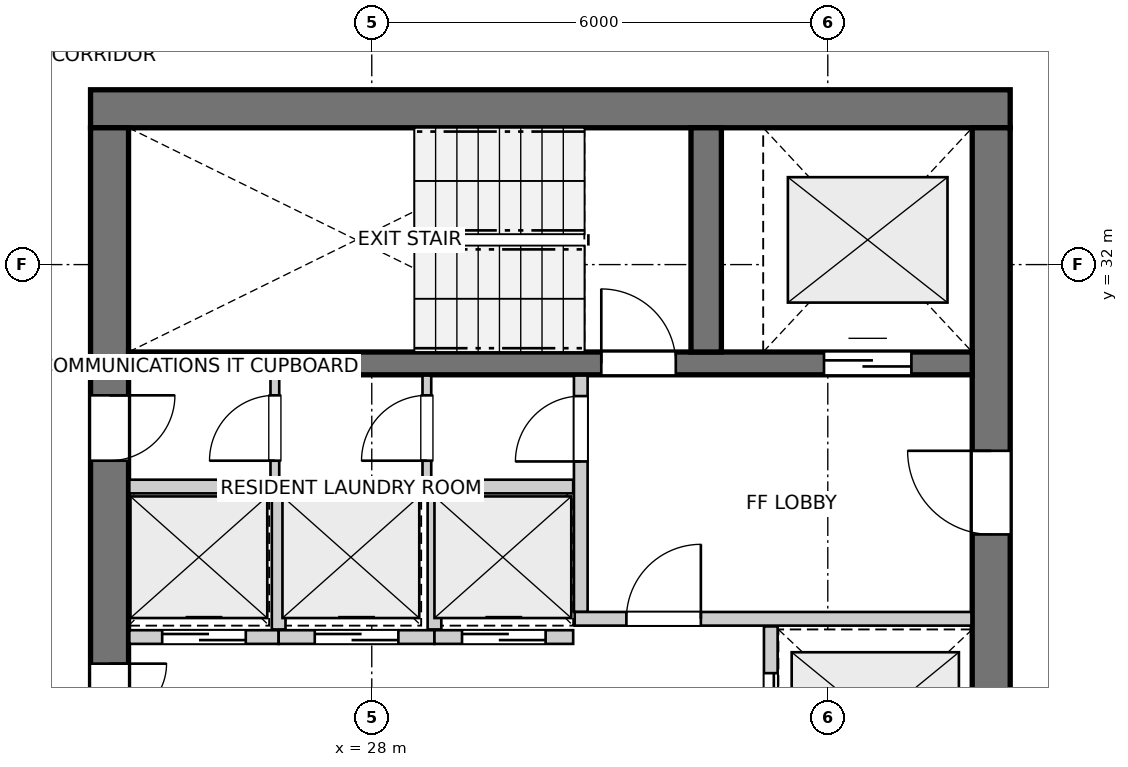
"""IFC4 building model, lengths in metres.
Left out: names, types, materials, properties, quantities, classifications, styles, units other than length and angle.
Written with IfcOpenShell. Run it as: python <this file> out.ifc"""

import sys

from ifc_helpers import new_model, si_unit, direction, frame, frame_2d, origin, place, context, subcontext, project, spatial, rectangle, extrude, source, transform, mapped, element, fill, save


model = new_model("IFC4")
c1 = context("Model", 3, precision=1e-05, world=origin(), true_north=direction((0.0, 1.0)))
c2 = subcontext(c1, "Body", "Model", "MODEL_VIEW")
j1 = project(units=[si_unit("LENGTHUNIT", "METRE"), si_unit("PLANEANGLEUNIT", "RADIAN")], contexts=[c1])
p1 = place(None, origin())
s1 = spatial("IfcSite", under=j1, at=p1, CompositionType="ELEMENT")
p2 = place(p1, origin())
s2 = spatial("IfcBuilding", under=s1, at=p2, CompositionType="ELEMENT")
p3 = place(p2, frame((0.0, 0.0, 221.2)))
s3 = spatial("IfcBuildingStorey", under=s2, at=p3, CompositionType="ELEMENT", Elevation=221.2)
p4 = place(p3, frame((36.4, 34.05, 0.0), z_axis=(0.0, 0.0, 1.0), x_axis=(-1.0, 0.0, 0.0)))
e1 = element("IfcWall", 1, at=p4, inside=s3, PredefinedType="SHEAR", context=c2, shape_type="SweptSolid", body=[
    extrude(rectangle(XDim=12.1, YDim=0.5, at=frame_2d((6.05, 0.0))), origin(), (0.0, 0.0, 1.0), 2.96),
])
p5 = place(p3, frame((24.55, 33.8, 0.0), z_axis=(0.0, 0.0, 1.0), x_axis=(0.0, -1.0, 0.0)))
e2 = element("IfcWall", 2, at=p5, inside=s3, PredefinedType="SHEAR", context=c2, shape_type="SweptSolid", body=[
    extrude(rectangle(XDim=15.6, YDim=0.5, at=frame_2d((7.8, 0.0))), origin(), (0.0, 0.0, 1.0), 2.96),
])
p6 = place(p5, frame((7.05, 0.0, 0.0)))
e3 = element("IfcOpeningElement", 3, at=p6, cuts=e2, PredefinedType="OPENING", context=c2, shape_type="SweptSolid", body=[
    extrude(rectangle(XDim=1.5, YDim=2.15, at=frame_2d((0.75, 1.075))), frame((0.0, 0.26, 0.0), z_axis=(0.0, -1.0, 0.0), x_axis=(1.0, 0.0, 0.0)), (0.0, 0.0, 1.0), 0.52),
])
p7 = place(p5, frame((3.52, 0.0, 0.0)))
e4 = element("IfcOpeningElement", 4, at=p7, cuts=e2, PredefinedType="OPENING", context=c2, shape_type="SweptSolid", body=[
    extrude(rectangle(XDim=0.86, YDim=2.05, at=frame_2d((0.43, 1.025))), frame((0.0, 0.26, 0.0), z_axis=(0.0, -1.0, 0.0), x_axis=(1.0, 0.0, 0.0)), (0.0, 0.0, 1.0), 0.52),
])
p8 = place(p5, frame((11.22, 0.0, 0.0)))
e5 = element("IfcOpeningElement", 5, at=p8, cuts=e2, PredefinedType="OPENING", context=c2, shape_type="SweptSolid", body=[
    extrude(rectangle(XDim=0.86, YDim=2.05, at=frame_2d((0.43, 1.025))), frame((0.0, 0.26, 0.0), z_axis=(0.0, -1.0, 0.0), x_axis=(1.0, 0.0, 0.0)), (0.0, 0.0, 1.0), 0.52),
])
p9 = place(p3, frame((36.15, 18.2, 0.0), z_axis=(0.0, 0.0, 1.0), x_axis=(0.0, 1.0, 0.0)))
e6 = element("IfcWall", 6, at=p9, inside=s3, PredefinedType="SHEAR", context=c2, shape_type="SweptSolid", body=[
    extrude(rectangle(XDim=15.6, YDim=0.5, at=frame_2d((7.8, 0.0))), origin(), (0.0, 0.0, 1.0), 2.96),
])
p10 = place(p9, frame((4.25, 0.0, 0.0)))
e7 = element("IfcOpeningElement", 7, at=p10, cuts=e6, PredefinedType="OPENING", context=c2, shape_type="SweptSolid", body=[
    extrude(rectangle(XDim=1.1, YDim=2.15, at=frame_2d((0.55, 1.075))), frame((0.0, 0.26, 0.0), z_axis=(0.0, -1.0, 0.0), x_axis=(1.0, 0.0, 0.0)), (0.0, 0.0, 1.0), 0.52),
])
p11 = place(p9, frame((10.25, 0.0, 0.0)))
e8 = element("IfcOpeningElement", 8, at=p11, cuts=e6, PredefinedType="OPENING", context=c2, shape_type="SweptSolid", body=[
    extrude(rectangle(XDim=1.1, YDim=2.15, at=frame_2d((0.55, 1.075))), frame((0.0, 0.26, 0.0), z_axis=(0.0, -1.0, 0.0), x_axis=(1.0, 0.0, 0.0)), (0.0, 0.0, 1.0), 0.52),
])
p12 = place(p3, frame((24.8, 30.7, 0.0), z_axis=(0.0, 0.0, 1.0), x_axis=(1.0, 0.0, 0.0)))
e9 = element("IfcWall", 9, at=p12, inside=s3, PredefinedType="SHEAR", context=c2, shape_type="SweptSolid", body=[
    extrude(rectangle(XDim=11.1, YDim=0.3, at=frame_2d((5.55, 0.0))), origin(), (0.0, 0.0, 1.0), 2.96),
])
p13 = place(p12, frame((6.22, 0.0, 0.0)))
e10 = element("IfcOpeningElement", 10, at=p13, cuts=e9, PredefinedType="OPENING", context=c2, shape_type="SweptSolid", body=[
    extrude(rectangle(XDim=0.98, YDim=2.15, at=frame_2d((0.49, 1.075))), frame((0.0, 0.16, 0.0), z_axis=(0.0, -1.0, 0.0), x_axis=(1.0, 0.0, 0.0)), (0.0, 0.0, 1.0), 0.32),
])
p14 = place(p12, frame((9.15, 0.0, 0.0)))
e11 = element("IfcOpeningElement", 11, at=p14, cuts=e9, PredefinedType="OPENING", context=c2, shape_type="SweptSolid", body=[
    extrude(rectangle(XDim=1.15, YDim=2.15, at=frame_2d((0.575, 1.075))), frame((0.0, 0.16, 0.0), z_axis=(0.0, -1.0, 0.0), x_axis=(1.0, 0.0, 0.0)), (0.0, 0.0, 1.0), 0.32),
])
p15 = place(p3, frame((32.4, 30.85, 0.0), z_axis=(0.0, 0.0, 1.0), x_axis=(0.0, 1.0, 0.0)))
e12 = element("IfcWall", 12, at=p15, inside=s3, PredefinedType="SHEAR", context=c2, shape_type="SweptSolid", body=[
    extrude(rectangle(XDim=2.95, YDim=0.4, at=frame_2d((1.475, 0.0))), origin(), (0.0, 0.0, 1.0), 2.96),
])
p16 = place(p3, frame((30.75, 27.43, 0.0), z_axis=(0.0, 0.0, 1.0), x_axis=(0.0, 1.0, 0.0)))
e13 = element("IfcWall", 13, at=p16, inside=s3, PredefinedType="PARTITIONING", context=c2, shape_type="SweptSolid", body=[
    extrude(rectangle(XDim=3.11, YDim=0.18, at=frame_2d((1.555, 0.0))), origin(), (0.0, 0.0, 1.0), 2.96),
])
p17 = place(p16, frame((1.98, 0.0, 0.0)))
e14 = element("IfcOpeningElement", 14, at=p17, cuts=e13, PredefinedType="OPENING", context=c2, shape_type="SweptSolid", body=[
    extrude(rectangle(XDim=0.86, YDim=2.05, at=frame_2d((0.43, 1.025))), frame((0.0, 0.1, 0.0), z_axis=(0.0, -1.0, 0.0), x_axis=(1.0, 0.0, 0.0)), (0.0, 0.0, 1.0), 0.2),
])
p18 = place(p3, frame((30.67, 27.34, 0.0), z_axis=(0.0, 0.0, 1.0), x_axis=(1.0, 0.0, 0.0)))
e15 = element("IfcWall", 15, at=p18, inside=s3, PredefinedType="PARTITIONING", context=c2, shape_type="SweptSolid", body=[
    extrude(rectangle(XDim=5.22, YDim=0.18, at=frame_2d((2.61, 0.0))), origin(), (0.0, 0.0, 1.0), 2.96),
])
p19 = place(p18, frame((0.68, 0.0, 0.0)))
e16 = element("IfcOpeningElement", 16, at=p19, cuts=e15, PredefinedType="OPENING", context=c2, shape_type="SweptSolid", body=[
    extrude(rectangle(XDim=0.98, YDim=2.15, at=frame_2d((0.49, 1.075))), frame((0.0, 0.1, 0.0), z_axis=(0.0, -1.0, 0.0), x_axis=(1.0, 0.0, 0.0)), (0.0, 0.0, 1.0), 0.2),
])
p20 = place(p3, frame((33.25, 24.76, 0.0), z_axis=(0.0, 0.0, 1.0), x_axis=(0.0, 1.0, 0.0)))
e17 = element("IfcWall", 17, at=p20, inside=s3, PredefinedType="PARTITIONING", context=c2, shape_type="SweptSolid", body=[
    extrude(rectangle(XDim=2.48, YDim=0.18, at=frame_2d((1.24, 0.0))), origin(), (0.0, 0.0, 1.0), 2.96),
])
p21 = place(p20, frame((0.615, 0.0, 0.0)))
e18 = element("IfcOpeningElement", 18, at=p21, cuts=e17, PredefinedType="OPENING", context=c2, shape_type="SweptSolid", body=[
    extrude(rectangle(XDim=1.25, YDim=2.15, at=frame_2d((0.625, 1.075))), frame((0.0, 0.1, 0.0), z_axis=(0.0, -1.0, 0.0), x_axis=(1.0, 0.0, 0.0)), (0.0, 0.0, 1.0), 0.2),
])
p22 = place(p3, frame((24.81, 29.08, 0.0), z_axis=(0.0, 0.0, 1.0), x_axis=(1.0, 0.0, 0.0)))
e19 = element("IfcWall", 19, at=p22, inside=s3, PredefinedType="PARTITIONING", context=c2, shape_type="SweptSolid", body=[
    extrude(rectangle(XDim=5.84, YDim=0.18, at=frame_2d((2.92, 0.0))), origin(), (0.0, 0.0, 1.0), 2.96),
])
p23 = place(p3, frame((24.81, 27.1, 0.0), z_axis=(0.0, 0.0, 1.0), x_axis=(1.0, 0.0, 0.0)))
e20 = element("IfcWall", 20, at=p23, inside=s3, PredefinedType="PARTITIONING", context=c2, shape_type="SweptSolid", body=[
    extrude(rectangle(XDim=1.965, YDim=0.18, at=frame_2d((0.982, 0.0))), origin(), (0.0, 0.0, 1.0), 2.96),
])
p24 = place(p23, frame((0.433, 0.0, 0.0)))
e21 = element("IfcOpeningElement", 21, at=p24, cuts=e20, PredefinedType="OPENING", context=c2, shape_type="SweptSolid", body=[
    extrude(rectangle(XDim=1.1, YDim=2.15, at=frame_2d((0.55, 1.075))), frame((0.0, 0.1, 0.0), z_axis=(0.0, -1.0, 0.0), x_axis=(1.0, 0.0, 0.0)), (0.0, 0.0, 1.0), 0.2),
])
p25 = place(p3, frame((26.775, 27.1, 0.0), z_axis=(0.0, 0.0, 1.0), x_axis=(1.0, 0.0, 0.0)))
e22 = element("IfcWall", 22, at=p25, inside=s3, PredefinedType="PARTITIONING", context=c2, shape_type="SweptSolid", body=[
    extrude(rectangle(XDim=2.05, YDim=0.18, at=frame_2d((1.025, 0.0))), origin(), (0.0, 0.0, 1.0), 2.96),
])
p26 = place(p25, frame((0.475, 0.0, 0.0)))
e23 = element("IfcOpeningElement", 23, at=p26, cuts=e22, PredefinedType="OPENING", context=c2, shape_type="SweptSolid", body=[
    extrude(rectangle(XDim=1.1, YDim=2.15, at=frame_2d((0.55, 1.075))), frame((0.0, 0.1, 0.0), z_axis=(0.0, -1.0, 0.0), x_axis=(1.0, 0.0, 0.0)), (0.0, 0.0, 1.0), 0.2),
])
p27 = place(p3, frame((26.775, 27.2, 0.0), z_axis=(0.0, 0.0, 1.0), x_axis=(0.0, 1.0, 0.0)))
e24 = element("IfcWall", 24, at=p27, inside=s3, PredefinedType="PARTITIONING", context=c2, shape_type="SweptSolid", body=[
    extrude(rectangle(XDim=1.78, YDim=0.18, at=frame_2d((0.89, 0.0))), origin(), (0.0, 0.0, 1.0), 2.96),
])
p28 = place(p3, frame((28.825, 27.1, 0.0), z_axis=(0.0, 0.0, 1.0), x_axis=(1.0, 0.0, 0.0)))
e25 = element("IfcWall", 25, at=p28, inside=s3, PredefinedType="PARTITIONING", context=c2, shape_type="SweptSolid", body=[
    extrude(rectangle(XDim=1.825, YDim=0.18, at=frame_2d((0.913, 0.0))), origin(), (0.0, 0.0, 1.0), 2.96),
])
p29 = place(p28, frame((0.363, 0.0, 0.0)))
e26 = element("IfcOpeningElement", 26, at=p29, cuts=e25, PredefinedType="OPENING", context=c2, shape_type="SweptSolid", body=[
    extrude(rectangle(XDim=1.1, YDim=2.15, at=frame_2d((0.55, 1.075))), frame((0.0, 0.1, 0.0), z_axis=(0.0, -1.0, 0.0), x_axis=(1.0, 0.0, 0.0)), (0.0, 0.0, 1.0), 0.2),
])
p30 = place(p3, frame((28.825, 27.2, 0.0), z_axis=(0.0, 0.0, 1.0), x_axis=(0.0, 1.0, 0.0)))
e27 = element("IfcWall", 27, at=p30, inside=s3, PredefinedType="PARTITIONING", context=c2, shape_type="SweptSolid", body=[
    extrude(rectangle(XDim=1.78, YDim=0.18, at=frame_2d((0.89, 0.0))), origin(), (0.0, 0.0, 1.0), 2.96),
])
p31 = place(p3, frame((26.725, 29.16, 0.0), z_axis=(0.0, 0.0, 1.0), x_axis=(0.0, 1.0, 0.0)))
e28 = element("IfcWall", 28, at=p31, inside=s3, PredefinedType="PARTITIONING", context=c2, shape_type="SweptSolid", body=[
    extrude(rectangle(XDim=1.38, YDim=0.115, at=frame_2d((0.69, 0.0))), origin(), (0.0, 0.0, 1.0), 2.96),
])
p32 = place(p31, frame((0.26, 0.0, 0.0)))
e29 = element("IfcOpeningElement", 29, at=p32, cuts=e28, PredefinedType="OPENING", context=c2, shape_type="SweptSolid", body=[
    extrude(rectangle(XDim=0.86, YDim=2.05, at=frame_2d((0.43, 1.025))), frame((0.0, 0.067, 0.0), z_axis=(0.0, -1.0, 0.0), x_axis=(1.0, 0.0, 0.0)), (0.0, 0.0, 1.0), 0.135),
])
p33 = place(p3, frame((28.725, 29.16, 0.0), z_axis=(0.0, 0.0, 1.0), x_axis=(0.0, 1.0, 0.0)))
e30 = element("IfcWall", 30, at=p33, inside=s3, PredefinedType="PARTITIONING", context=c2, shape_type="SweptSolid", body=[
    extrude(rectangle(XDim=1.38, YDim=0.115, at=frame_2d((0.69, 0.0))), origin(), (0.0, 0.0, 1.0), 2.96),
])
p34 = place(p33, frame((0.26, 0.0, 0.0)))
e31 = element("IfcOpeningElement", 31, at=p34, cuts=e30, PredefinedType="OPENING", context=c2, shape_type="SweptSolid", body=[
    extrude(rectangle(XDim=0.86, YDim=2.05, at=frame_2d((0.43, 1.025))), frame((0.0, 0.067, 0.0), z_axis=(0.0, -1.0, 0.0), x_axis=(1.0, 0.0, 0.0)), (0.0, 0.0, 1.0), 0.135),
])
m1 = source(origin(), c2, "Body", "SweptSolid", [
    extrude(rectangle(XDim=0.98, YDim=2.15, at=frame_2d((0.49, 1.075))), frame((0.0, 0.025, 0.0), z_axis=(0.0, -1.0, 0.0), x_axis=(1.0, 0.0, 0.0)), (0.0, 0.0, 1.0), 0.05),
])
p35 = place(p13, origin())
e32 = element("IfcDoor", 32, at=p35, inside=s3, OperationType="SINGLE_SWING_LEFT", PredefinedType="DOOR", context=c2, shape_type="MappedRepresentation", body=[
    mapped(m1, transform((0.0, 0.0, 0.0), x_axis=(1.0, 0.0, 0.0), y_axis=(0.0, 1.0, 0.0), z_axis=(0.0, 0.0, 1.0), scale=1.0)),
])
fill(e10, e32)
m2 = source(origin(), c2, "Body", "SweptSolid", [
    extrude(rectangle(XDim=1.15, YDim=2.15, at=frame_2d((0.575, 1.075))), frame((0.0, 0.025, 0.0), z_axis=(0.0, -1.0, 0.0), x_axis=(1.0, 0.0, 0.0)), (0.0, 0.0, 1.0), 0.05),
])
p36 = place(p14, origin())
e33 = element("IfcDoor", 33, at=p36, inside=s3, OperationType="DOUBLE_DOOR_SLIDING", PredefinedType="DOOR", context=c2, shape_type="MappedRepresentation", body=[
    mapped(m2, transform((0.0, 0.0, 0.0), x_axis=(1.0, 0.0, 0.0), y_axis=(0.0, 1.0, 0.0), z_axis=(0.0, 0.0, 1.0), scale=1.0)),
])
fill(e11, e33)
m3 = source(origin(), c2, "Body", "SweptSolid", [
    extrude(rectangle(XDim=1.1, YDim=2.15, at=frame_2d((0.55, 1.075))), frame((0.0, 0.025, 0.0), z_axis=(0.0, -1.0, 0.0), x_axis=(1.0, 0.0, 0.0)), (0.0, 0.0, 1.0), 0.05),
])
p37 = place(p11, origin())
e34 = element("IfcDoor", 34, at=p37, inside=s3, OperationType="SINGLE_SWING_RIGHT", PredefinedType="DOOR", context=c2, shape_type="MappedRepresentation", body=[
    mapped(m3, transform((0.0, 0.0, 0.0), x_axis=(1.0, 0.0, 0.0), y_axis=(0.0, 1.0, 0.0), z_axis=(0.0, 0.0, 1.0), scale=1.0)),
])
fill(e8, e34)
m4 = source(origin(), c2, "Body", "SweptSolid", [
    extrude(rectangle(XDim=1.5, YDim=2.15, at=frame_2d((0.75, 1.075))), frame((0.0, 0.025, 0.0), z_axis=(0.0, -1.0, 0.0), x_axis=(1.0, 0.0, 0.0)), (0.0, 0.0, 1.0), 0.05),
])
p38 = place(p6, origin())
e35 = element("IfcDoor", 35, at=p38, inside=s3, OperationType="DOUBLE_DOOR_SINGLE_SWING", PredefinedType="DOOR", context=c2, shape_type="MappedRepresentation", body=[
    mapped(m4, transform((0.0, 0.0, 0.0), x_axis=(1.0, 0.0, 0.0), y_axis=(0.0, 1.0, 0.0), z_axis=(0.0, 0.0, 1.0), scale=1.0)),
])
fill(e3, e35)
m5 = source(origin(), c2, "Body", "SweptSolid", [
    extrude(rectangle(XDim=0.86, YDim=2.05, at=frame_2d((0.43, 1.025))), frame((0.0, 0.025, 0.0), z_axis=(0.0, -1.0, 0.0), x_axis=(1.0, 0.0, 0.0)), (0.0, 0.0, 1.0), 0.05),
])
p39 = place(p7, origin())
e36 = element("IfcDoor", 36, at=p39, inside=s3, OperationType="SINGLE_SWING_LEFT", PredefinedType="DOOR", context=c2, shape_type="MappedRepresentation", body=[
    mapped(m5, transform((0.0, 0.0, 0.0), x_axis=(1.0, 0.0, 0.0), y_axis=(0.0, 1.0, 0.0), z_axis=(0.0, 0.0, 1.0), scale=1.0)),
])
fill(e4, e36)
p40 = place(p17, origin())
e37 = element("IfcDoor", 37, at=p40, inside=s3, OperationType="SINGLE_SWING_LEFT", PredefinedType="DOOR", context=c2, shape_type="MappedRepresentation", body=[
    mapped(m5, transform((0.0, 0.0, 0.0), x_axis=(1.0, 0.0, 0.0), y_axis=(0.0, 1.0, 0.0), z_axis=(0.0, 0.0, 1.0), scale=1.0)),
])
fill(e14, e37)
p41 = place(p19, origin())
e38 = element("IfcDoor", 38, at=p41, inside=s3, OperationType="SINGLE_SWING_RIGHT", PredefinedType="DOOR", context=c2, shape_type="MappedRepresentation", body=[
    mapped(m1, transform((0.0, 0.0, 0.0), x_axis=(1.0, 0.0, 0.0), y_axis=(0.0, 1.0, 0.0), z_axis=(0.0, 0.0, 1.0), scale=1.0)),
])
fill(e16, e38)
m6 = source(origin(), c2, "Body", "SweptSolid", [
    extrude(rectangle(XDim=1.25, YDim=2.15, at=frame_2d((0.625, 1.075))), frame((0.0, 0.025, 0.0), z_axis=(0.0, -1.0, 0.0), x_axis=(1.0, 0.0, 0.0)), (0.0, 0.0, 1.0), 0.05),
])
p42 = place(p21, origin())
e39 = element("IfcDoor", 39, at=p42, inside=s3, OperationType="DOUBLE_DOOR_SLIDING", PredefinedType="DOOR", context=c2, shape_type="MappedRepresentation", body=[
    mapped(m6, transform((0.0, 0.0, 0.0), x_axis=(1.0, 0.0, 0.0), y_axis=(0.0, 1.0, 0.0), z_axis=(0.0, 0.0, 1.0), scale=1.0)),
])
fill(e18, e39)
p43 = place(p24, origin())
e40 = element("IfcDoor", 40, at=p43, inside=s3, OperationType="DOUBLE_DOOR_SLIDING", PredefinedType="DOOR", context=c2, shape_type="MappedRepresentation", body=[
    mapped(m3, transform((0.0, 0.0, 0.0), x_axis=(1.0, 0.0, 0.0), y_axis=(0.0, 1.0, 0.0), z_axis=(0.0, 0.0, 1.0), scale=1.0)),
])
fill(e21, e40)
p44 = place(p26, origin())
e41 = element("IfcDoor", 41, at=p44, inside=s3, OperationType="DOUBLE_DOOR_SLIDING", PredefinedType="DOOR", context=c2, shape_type="MappedRepresentation", body=[
    mapped(m3, transform((0.0, 0.0, 0.0), x_axis=(1.0, 0.0, 0.0), y_axis=(0.0, 1.0, 0.0), z_axis=(0.0, 0.0, 1.0), scale=1.0)),
])
fill(e23, e41)
p45 = place(p29, origin())
e42 = element("IfcDoor", 42, at=p45, inside=s3, OperationType="DOUBLE_DOOR_SLIDING", PredefinedType="DOOR", context=c2, shape_type="MappedRepresentation", body=[
    mapped(m3, transform((0.0, 0.0, 0.0), x_axis=(1.0, 0.0, 0.0), y_axis=(0.0, 1.0, 0.0), z_axis=(0.0, 0.0, 1.0), scale=1.0)),
])
fill(e26, e42)
p46 = place(p32, origin())
e43 = element("IfcDoor", 43, at=p46, inside=s3, OperationType="SINGLE_SWING_LEFT", PredefinedType="DOOR", context=c2, shape_type="MappedRepresentation", body=[
    mapped(m5, transform((0.0, 0.0, 0.0), x_axis=(1.0, 0.0, 0.0), y_axis=(0.0, 1.0, 0.0), z_axis=(0.0, 0.0, 1.0), scale=1.0)),
])
fill(e29, e43)
p47 = place(p34, origin())
e44 = element("IfcDoor", 44, at=p47, inside=s3, OperationType="SINGLE_SWING_LEFT", PredefinedType="DOOR", context=c2, shape_type="MappedRepresentation", body=[
    mapped(m5, transform((0.0, 0.0, 0.0), x_axis=(1.0, 0.0, 0.0), y_axis=(0.0, 1.0, 0.0), z_axis=(0.0, 0.0, 1.0), scale=1.0)),
])
fill(e31, e44)
save(model, sys.argv[1])
